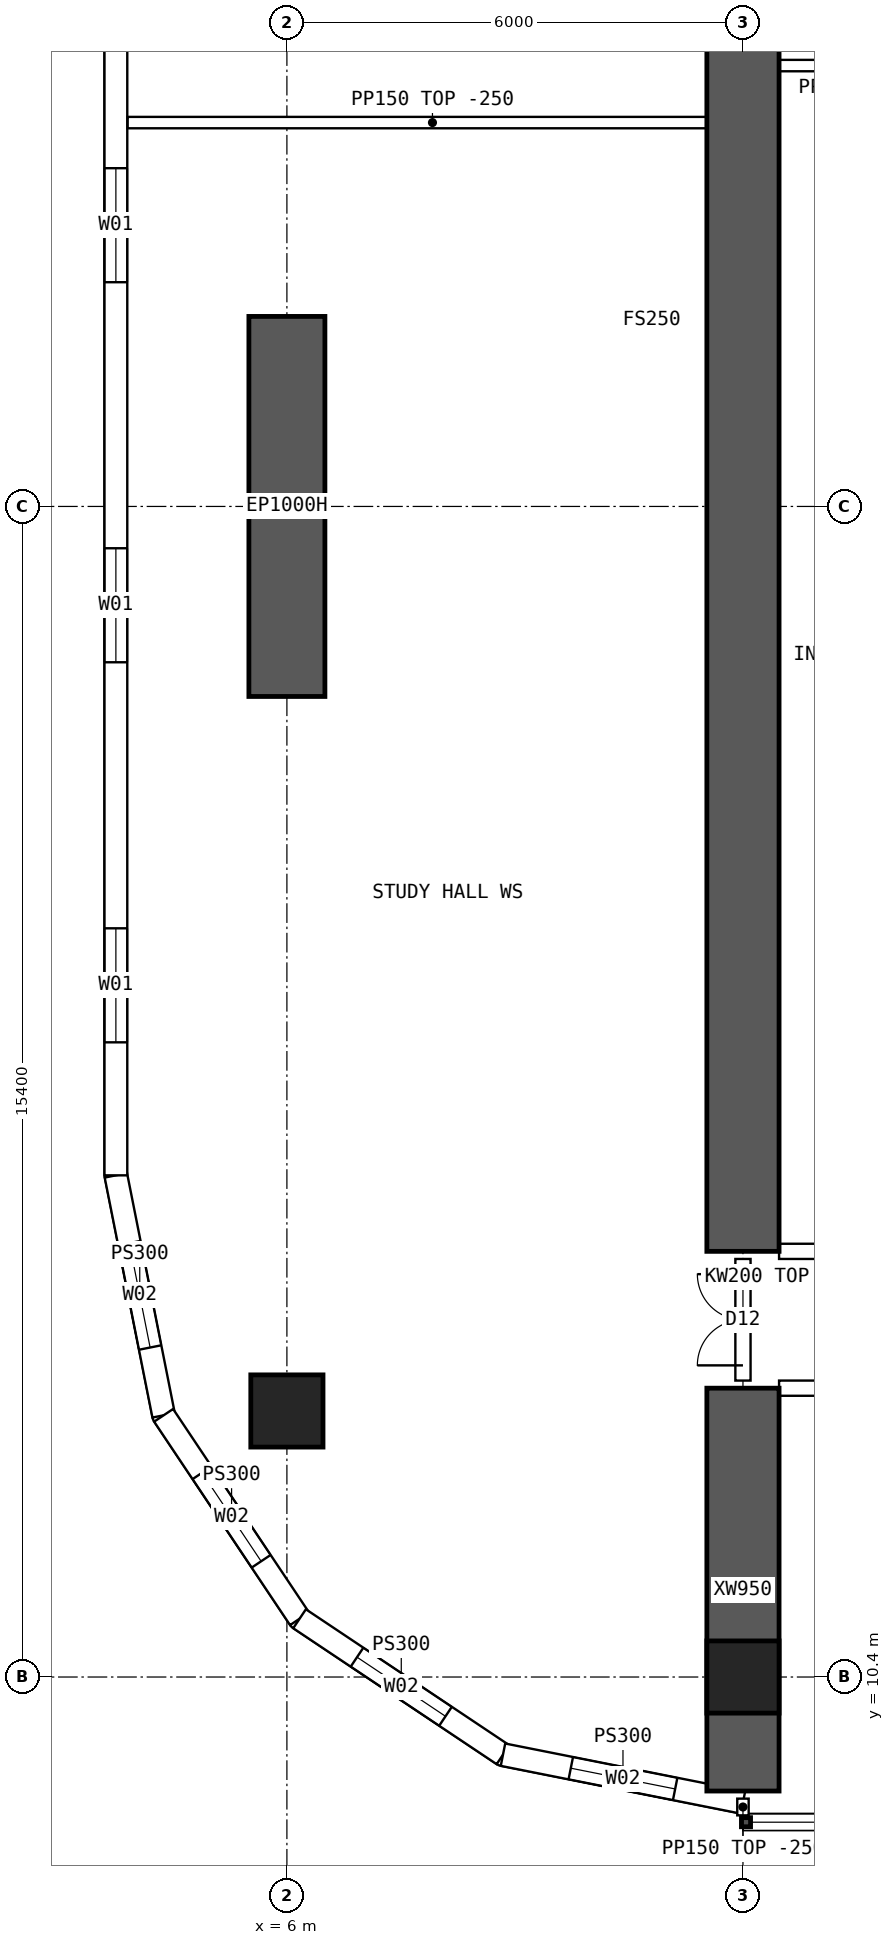
"""IFC4 building model, lengths in metres.
Left out: names, types, materials, properties, quantities, classifications, styles, units other than length and angle.
Written with IfcOpenShell. Run it as: python <this file> out.ifc"""

import sys

from ifc_helpers import new_model, si_unit, direction, frame, frame_2d, origin, origin_2d, place, context, subcontext, project, spatial, polyline, rectangle, hollow_rectangle, outline, extrude, element, fill, save


model = new_model("IFC4")
c1 = context("Model", 3, precision=1e-05, world=origin(), true_north=direction((0.0, 1.0)))
c2 = subcontext(c1, "Body", "Model", "MODEL_VIEW")
j1 = project(units=[si_unit("LENGTHUNIT", "METRE"), si_unit("PLANEANGLEUNIT", "RADIAN")], contexts=[c1])
p1 = place(None, origin())
s1 = spatial("IfcSite", under=j1, at=p1, CompositionType="ELEMENT")
p2 = place(p1, origin())
s2 = spatial("IfcBuilding", under=s1, at=p2, CompositionType="ELEMENT")
p3 = place(p2, frame((0.0, 0.0, 125.65)))
s3 = spatial("IfcBuildingStorey", under=s2, at=p3, CompositionType="ELEMENT", Elevation=125.65)
for number, where, z_axis, x_axis in (
    (1, (12.0, 10.4, 0.0), (0.0, 0.0, 1.0), (1.0, 0.0, 0.0)),
    (2, (6.0, 13.9, 0.0), (0.0, 0.0, 1.0), (1.0, 0.0, 0.0)),
):
    element("IfcColumn", number, at=place(p3, frame(where, z_axis=z_axis, x_axis=x_axis)), inside=s3, PredefinedType="COLUMN", context=c2, shape_type="SweptSolid", body=[
        extrude(hollow_rectangle(XDim=0.95, YDim=0.95, WallThickness=0.095, at=origin_2d()), origin(), (0.0, 0.0, 1.0), 3.75),
    ])
p4 = place(p3, frame((6.0, 23.3, 0.0), z_axis=(0.0, 0.0, 1.0), x_axis=(0.0, 1.0, 0.0)))
e3 = element("IfcWall", 3, at=p4, inside=s3, PredefinedType="SHEAR", context=c2, shape_type="SweptSolid", body=[
    extrude(rectangle(XDim=5.0, YDim=1.0, at=frame_2d((2.5, 0.0))), origin(), (0.0, 0.0, 1.0), 3.75),
])
p5 = place(p3, frame((12.0, 8.9, 0.0), z_axis=(0.0, 0.0, 1.0), x_axis=(0.0, 1.0, 0.0)))
e4 = element("IfcWall", 4, at=p5, inside=s3, PredefinedType="SHEAR", context=c2, shape_type="SweptSolid", body=[
    extrude(rectangle(XDim=5.3, YDim=0.95, at=frame_2d((2.65, 0.0))), origin(), (0.0, 0.0, 1.0), 3.75),
])
p6 = place(p3, frame((12.0, 16.0, 0.0), z_axis=(0.0, 0.0, 1.0), x_axis=(0.0, 1.0, 0.0)))
e5 = element("IfcWall", 5, at=p6, inside=s3, PredefinedType="SHEAR", context=c2, shape_type="SweptSolid", body=[
    extrude(rectangle(XDim=32.0, YDim=0.95, at=frame_2d((16.0, 0.0))), origin(), (0.0, 0.0, 1.0), 3.75),
])
p7 = place(p3, frame((3.75, 47.0, 0.0), z_axis=(0.0, 0.0, 1.0), x_axis=(0.0, -1.0, 0.0)))
e6 = element("IfcWall", 6, at=p7, inside=s3, PredefinedType="SOLIDWALL", context=c2, shape_type="SweptSolid", body=[
    extrude(outline(polyline([(-0.015, -0.15), (30.015, -0.15), (29.985, 0.15), (0.015, 0.15), (-0.015, -0.15)])), origin(), (0.0, 0.0, 1.0), 3.5),
])
p8 = place(p7, frame((1.75, 0.0, 0.9)))
e7 = element("IfcOpeningElement", 7, at=p8, cuts=e6, PredefinedType="OPENING", context=c2, shape_type="SweptSolid", body=[
    extrude(rectangle(XDim=1.5, YDim=2.0, at=frame_2d((0.75, 1.0))), frame((0.0, 0.16, 0.0), z_axis=(0.0, -1.0, 0.0), x_axis=(1.0, 0.0, 0.0)), (0.0, 0.0, 1.0), 0.32),
])
p9 = place(p7, frame((6.75, 0.0, 0.9)))
e8 = element("IfcOpeningElement", 8, at=p9, cuts=e6, PredefinedType="OPENING", context=c2, shape_type="SweptSolid", body=[
    extrude(rectangle(XDim=1.5, YDim=2.0, at=frame_2d((0.75, 1.0))), frame((0.0, 0.16, 0.0), z_axis=(0.0, -1.0, 0.0), x_axis=(1.0, 0.0, 0.0)), (0.0, 0.0, 1.0), 0.32),
])
p10 = place(p7, frame((11.75, 0.0, 0.9)))
e9 = element("IfcOpeningElement", 9, at=p10, cuts=e6, PredefinedType="OPENING", context=c2, shape_type="SweptSolid", body=[
    extrude(rectangle(XDim=1.5, YDim=2.0, at=frame_2d((0.75, 1.0))), frame((0.0, 0.16, 0.0), z_axis=(0.0, -1.0, 0.0), x_axis=(1.0, 0.0, 0.0)), (0.0, 0.0, 1.0), 0.32),
])
p11 = place(p7, frame((16.75, 0.0, 0.9)))
e10 = element("IfcOpeningElement", 10, at=p11, cuts=e6, PredefinedType="OPENING", context=c2, shape_type="SweptSolid", body=[
    extrude(rectangle(XDim=1.5, YDim=2.0, at=frame_2d((0.75, 1.0))), frame((0.0, 0.16, 0.0), z_axis=(0.0, -1.0, 0.0), x_axis=(1.0, 0.0, 0.0)), (0.0, 0.0, 1.0), 0.32),
])
p12 = place(p7, frame((21.75, 0.0, 0.9)))
e11 = element("IfcOpeningElement", 11, at=p12, cuts=e6, PredefinedType="OPENING", context=c2, shape_type="SweptSolid", body=[
    extrude(rectangle(XDim=1.5, YDim=2.0, at=frame_2d((0.75, 1.0))), frame((0.0, 0.16, 0.0), z_axis=(0.0, -1.0, 0.0), x_axis=(1.0, 0.0, 0.0)), (0.0, 0.0, 1.0), 0.32),
])
p13 = place(p7, frame((26.75, 0.0, 0.9)))
e12 = element("IfcOpeningElement", 12, at=p13, cuts=e6, PredefinedType="OPENING", context=c2, shape_type="SweptSolid", body=[
    extrude(rectangle(XDim=1.5, YDim=2.0, at=frame_2d((0.75, 1.0))), frame((0.0, 0.16, 0.0), z_axis=(0.0, -1.0, 0.0), x_axis=(1.0, 0.0, 0.0)), (0.0, 0.0, 1.0), 0.32),
])
p14 = place(p3, frame((3.75, 17.0, 0.0), z_axis=(0.0, 0.0, 1.0), x_axis=(0.195080412259, -0.980787251524, 0.0)))
e13 = element("IfcWall", 13, at=p14, inside=s3, PredefinedType="SOLIDWALL", context=c2, shape_type="SweptSolid", body=[
    extrude(outline(polyline([(-0.015, -0.15), (3.249, -0.15), (3.189, 0.15), (0.015, 0.15), (-0.015, -0.15)])), origin(), (0.0, 0.0, 1.0), 3.5),
])
p15 = place(p14, frame((0.909, 0.0, 0.9)))
e14 = element("IfcOpeningElement", 14, at=p15, cuts=e13, PredefinedType="OPENING", context=c2, shape_type="SweptSolid", body=[
    extrude(rectangle(XDim=1.4, YDim=1.8, at=frame_2d((0.7, 0.9))), frame((0.0, 0.16, 0.0), z_axis=(0.0, -1.0, 0.0), x_axis=(1.0, 0.0, 0.0)), (0.0, 0.0, 1.0), 0.32),
])
p16 = place(p3, frame((4.378, 13.843, 0.0), z_axis=(0.0, 0.0, 1.0), x_axis=(0.555609954424, -0.831443069936, 0.0)))
e15 = element("IfcWall", 15, at=p16, inside=s3, PredefinedType="SOLIDWALL", context=c2, shape_type="SweptSolid", body=[
    extrude(outline(polyline([(-0.03, -0.15), (3.249, -0.15), (3.189, 0.15), (0.03, 0.15), (-0.03, -0.15)])), origin(), (0.0, 0.0, 1.0), 3.5),
])
p17 = place(p16, frame((0.909, 0.0, 0.9)))
e16 = element("IfcOpeningElement", 16, at=p17, cuts=e15, PredefinedType="OPENING", context=c2, shape_type="SweptSolid", body=[
    extrude(rectangle(XDim=1.4, YDim=1.8, at=frame_2d((0.7, 0.9))), frame((0.0, 0.16, 0.0), z_axis=(0.0, -1.0, 0.0), x_axis=(1.0, 0.0, 0.0)), (0.0, 0.0, 1.0), 0.32),
])
p18 = place(p3, frame((6.167, 11.167, 0.0), z_axis=(0.0, 0.0, 1.0), x_axis=(0.831443069936, -0.555609954424, 0.0)))
e17 = element("IfcWall", 17, at=p18, inside=s3, PredefinedType="SOLIDWALL", context=c2, shape_type="SweptSolid", body=[
    extrude(outline(polyline([(-0.03, -0.15), (3.249, -0.15), (3.189, 0.15), (0.03, 0.15), (-0.03, -0.15)])), origin(), (0.0, 0.0, 1.0), 3.5),
])
p19 = place(p18, frame((0.909, 0.0, 0.9)))
e18 = element("IfcOpeningElement", 18, at=p19, cuts=e17, PredefinedType="OPENING", context=c2, shape_type="SweptSolid", body=[
    extrude(rectangle(XDim=1.4, YDim=1.8, at=frame_2d((0.7, 0.9))), frame((0.0, 0.16, 0.0), z_axis=(0.0, -1.0, 0.0), x_axis=(1.0, 0.0, 0.0)), (0.0, 0.0, 1.0), 0.32),
])
p20 = place(p3, frame((8.843, 9.378, 0.0), z_axis=(0.0, 0.0, 1.0), x_axis=(0.980787251524, -0.195080412259, 0.0)))
e19 = element("IfcWall", 19, at=p20, inside=s3, PredefinedType="SOLIDWALL", context=c2, shape_type="SweptSolid", body=[
    extrude(outline(polyline([(-0.03, -0.15), (3.249, -0.15), (3.189, 0.15), (0.03, 0.15), (-0.03, -0.15)])), origin(), (0.0, 0.0, 1.0), 3.5),
])
p21 = place(p20, frame((0.909, 0.0, 0.9)))
e20 = element("IfcOpeningElement", 20, at=p21, cuts=e19, PredefinedType="OPENING", context=c2, shape_type="SweptSolid", body=[
    extrude(rectangle(XDim=1.4, YDim=1.8, at=frame_2d((0.7, 0.9))), frame((0.0, 0.16, 0.0), z_axis=(0.0, -1.0, 0.0), x_axis=(1.0, 0.0, 0.0)), (0.0, 0.0, 1.0), 0.32),
])
p22 = place(p3, frame((12.475, 14.2, 0.0), z_axis=(0.0, 0.0, 1.0), x_axis=(1.0, 0.0, 0.0)))
e21 = element("IfcWall", 21, at=p22, inside=s3, PredefinedType="SOLIDWALL", context=c2, shape_type="SweptSolid", body=[
    extrude(outline(polyline([(0.0, 0.0), (5.05, 0.0), (5.05, 3.1), (0.0, 3.1), (0.0, 0.0)])), frame((0.0, 0.1, 0.0), z_axis=(0.0, -1.0, 0.0), x_axis=(1.0, 0.0, 0.0)), (0.0, 0.0, 1.0), 0.2),
])
p23 = place(p22, frame((0.6, 0.0, 0.0)))
e22 = element("IfcOpeningElement", 22, at=p23, cuts=e21, PredefinedType="OPENING", context=c2, shape_type="SweptSolid", body=[
    extrude(rectangle(XDim=1.0, YDim=2.1, at=frame_2d((0.5, 1.05))), frame((0.0, 0.11, 0.0), z_axis=(0.0, -1.0, 0.0), x_axis=(1.0, 0.0, 0.0)), (0.0, 0.0, 1.0), 0.22),
])
p24 = place(p3, frame((12.475, 16.0, 0.0), z_axis=(0.0, 0.0, 1.0), x_axis=(1.0, 0.0, 0.0)))
e23 = element("IfcWall", 23, at=p24, inside=s3, PredefinedType="SOLIDWALL", context=c2, shape_type="SweptSolid", body=[
    extrude(rectangle(XDim=5.05, YDim=0.2, at=frame_2d((2.525, 0.0))), origin(), (0.0, 0.0, 1.0), 3.5),
])
p25 = place(p24, frame((3.325, 0.0, 0.0)))
e24 = element("IfcOpeningElement", 24, at=p25, cuts=e23, PredefinedType="OPENING", context=c2, shape_type="SweptSolid", body=[
    extrude(rectangle(XDim=1.6, YDim=2.1, at=frame_2d((0.8, 1.05))), frame((0.0, 0.11, 0.0), z_axis=(0.0, -1.0, 0.0), x_axis=(1.0, 0.0, 0.0)), (0.0, 0.0, 1.0), 0.22),
])
p26 = place(p3, frame((12.0, 31.6, 0.0), z_axis=(0.0, 0.0, 1.0), x_axis=(1.0, 0.0, 0.0)))
e25 = element("IfcWall", 25, at=p26, inside=s3, PredefinedType="PARTITIONING", context=c2, shape_type="SweptSolid", body=[
    extrude(rectangle(XDim=3.6, YDim=0.15, at=frame_2d((1.8, 0.0))), origin(), (0.0, 0.0, 1.0), 3.5),
])
p27 = place(p3, frame((3.905, 30.85, 0.0), z_axis=(0.0, 0.0, 1.0), x_axis=(1.0, 0.0, 0.0)))
e26 = element("IfcWall", 26, at=p27, inside=s3, PredefinedType="PARTITIONING", context=c2, shape_type="SweptSolid", body=[
    extrude(outline(polyline([(0.0, 0.0), (8.02, 0.0), (8.02, 3.5), (2.397, 3.5), (2.395, 3.05), (1.797, 3.05), (1.795, 3.5), (0.0, 3.5), (0.0, 0.0)])), frame((0.0, 0.075, 0.0), z_axis=(0.0, -1.0, 0.0), x_axis=(1.0, 0.0, 0.0)), (0.0, 0.0, 1.0), 0.15),
])
p28 = place(p3, frame((12.0, 14.3, 0.0), z_axis=(0.0, 0.0, 1.0), x_axis=(0.0, 1.0, 0.0)))
e27 = element("IfcWall", 27, at=p28, inside=s3, PredefinedType="SOLIDWALL", context=c2, shape_type="SweptSolid", body=[
    extrude(outline(polyline([(0.0, 0.0), (1.6, 0.0), (1.6, 3.1), (0.0, 3.1), (0.0, 0.0)])), frame((0.0, 0.1, 0.0), z_axis=(0.0, -1.0, 0.0), x_axis=(1.0, 0.0, 0.0)), (0.0, 0.0, 1.0), 0.2),
])
p29 = place(p28, frame((0.2, 0.0, 0.0)))
e28 = element("IfcOpeningElement", 28, at=p29, cuts=e27, PredefinedType="OPENING", context=c2, shape_type="SweptSolid", body=[
    extrude(rectangle(XDim=1.2, YDim=2.1, at=frame_2d((0.6, 1.05))), frame((0.0, 0.11, 0.0), z_axis=(0.0, -1.0, 0.0), x_axis=(1.0, 0.0, 0.0)), (0.0, 0.0, 1.0), 0.22),
])
p30 = place(p3, frame((12.0, 8.8, 0.0), z_axis=(0.0, 0.0, 1.0), x_axis=(0.0, -1.0, 0.0)))
e29 = element("IfcWall", 29, at=p30, inside=s3, PredefinedType="PARTITIONING", context=c2, shape_type="SweptSolid", body=[
    extrude(rectangle(XDim=0.22, YDim=0.15, at=frame_2d((0.11, 0.0))), origin(), (0.0, 0.0, 1.0), 3.5),
])
p31 = place(p11, origin())
e30 = element("IfcWindow", 30, at=p31, inside=s3, PartitioningType="SINGLE_PANEL", PredefinedType="WINDOW", context=c2, shape_type="SweptSolid", body=[
    extrude(rectangle(XDim=1.5, YDim=2.0, at=frame_2d((0.75, 1.0))), frame((0.0, 0.03, 0.0), z_axis=(0.0, -1.0, 0.0), x_axis=(1.0, 0.0, 0.0)), (0.0, 0.0, 1.0), 0.06),
])
fill(e10, e30)
p32 = place(p12, origin())
e31 = element("IfcWindow", 31, at=p32, inside=s3, PartitioningType="SINGLE_PANEL", PredefinedType="WINDOW", context=c2, shape_type="SweptSolid", body=[
    extrude(rectangle(XDim=1.5, YDim=2.0, at=frame_2d((0.75, 1.0))), frame((0.0, 0.03, 0.0), z_axis=(0.0, -1.0, 0.0), x_axis=(1.0, 0.0, 0.0)), (0.0, 0.0, 1.0), 0.06),
])
fill(e11, e31)
p33 = place(p13, origin())
e32 = element("IfcWindow", 32, at=p33, inside=s3, PartitioningType="SINGLE_PANEL", PredefinedType="WINDOW", context=c2, shape_type="SweptSolid", body=[
    extrude(rectangle(XDim=1.5, YDim=2.0, at=frame_2d((0.75, 1.0))), frame((0.0, 0.03, 0.0), z_axis=(0.0, -1.0, 0.0), x_axis=(1.0, 0.0, 0.0)), (0.0, 0.0, 1.0), 0.06),
])
fill(e12, e32)
p34 = place(p15, origin())
e33 = element("IfcWindow", 33, at=p34, inside=s3, PartitioningType="SINGLE_PANEL", PredefinedType="WINDOW", context=c2, shape_type="SweptSolid", body=[
    extrude(rectangle(XDim=1.4, YDim=1.8, at=frame_2d((0.7, 0.9))), frame((0.0, 0.03, 0.0), z_axis=(0.0, -1.0, 0.0), x_axis=(1.0, 0.0, 0.0)), (0.0, 0.0, 1.0), 0.06),
])
fill(e14, e33)
p35 = place(p17, origin())
e34 = element("IfcWindow", 34, at=p35, inside=s3, PartitioningType="SINGLE_PANEL", PredefinedType="WINDOW", context=c2, shape_type="SweptSolid", body=[
    extrude(rectangle(XDim=1.4, YDim=1.8, at=frame_2d((0.7, 0.9))), frame((0.0, 0.03, 0.0), z_axis=(0.0, -1.0, 0.0), x_axis=(1.0, 0.0, 0.0)), (0.0, 0.0, 1.0), 0.06),
])
fill(e16, e34)
p36 = place(p19, origin())
e35 = element("IfcWindow", 35, at=p36, inside=s3, PartitioningType="SINGLE_PANEL", PredefinedType="WINDOW", context=c2, shape_type="SweptSolid", body=[
    extrude(rectangle(XDim=1.4, YDim=1.8, at=frame_2d((0.7, 0.9))), frame((0.0, 0.03, 0.0), z_axis=(0.0, -1.0, 0.0), x_axis=(1.0, 0.0, 0.0)), (0.0, 0.0, 1.0), 0.06),
])
fill(e18, e35)
p37 = place(p21, origin())
e36 = element("IfcWindow", 36, at=p37, inside=s3, PartitioningType="SINGLE_PANEL", PredefinedType="WINDOW", context=c2, shape_type="SweptSolid", body=[
    extrude(rectangle(XDim=1.4, YDim=1.8, at=frame_2d((0.7, 0.9))), frame((0.0, 0.03, 0.0), z_axis=(0.0, -1.0, 0.0), x_axis=(1.0, 0.0, 0.0)), (0.0, 0.0, 1.0), 0.06),
])
fill(e20, e36)
p38 = place(p29, origin())
e37 = element("IfcDoor", 37, at=p38, inside=s3, OperationType="DOUBLE_DOOR_SINGLE_SWING", PredefinedType="DOOR", context=c2, shape_type="SweptSolid", body=[
    extrude(rectangle(XDim=1.2, YDim=2.1, at=frame_2d((0.6, 1.05))), frame((0.0, 0.025, 0.0), z_axis=(0.0, -1.0, 0.0), x_axis=(1.0, 0.0, 0.0)), (0.0, 0.0, 1.0), 0.05),
])
fill(e28, e37)
save(model, sys.argv[1])
